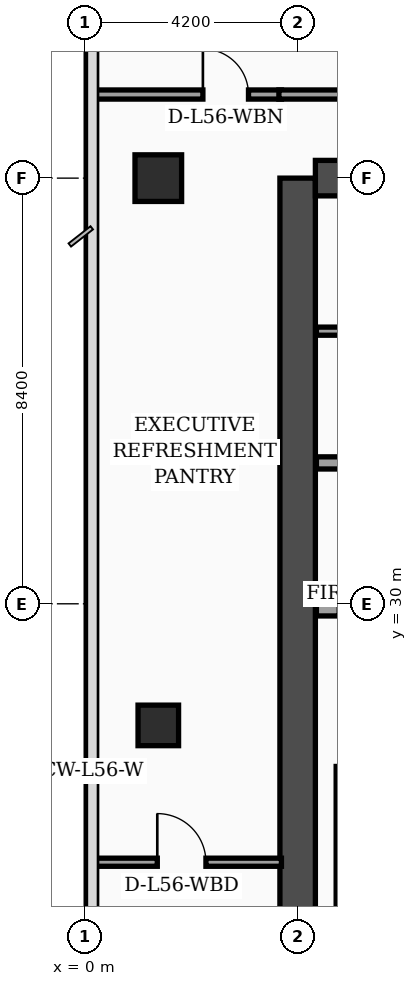
"""IFC4 building model, lengths in metres.
Left out: names, types, materials, properties, quantities, classifications, styles, units other than length and angle.
Written with IfcOpenShell. Run it as: python <this file> out.ifc"""

import sys

from ifc_helpers import new_model, si_unit, direction, frame, frame_2d, origin, origin_2d, place, context, subcontext, project, spatial, rectangle, extrude, element, fill, save


model = new_model("IFC4")
c1 = context("Model", 3, precision=1e-05, world=origin(), true_north=direction((0.0, 1.0)))
c2 = subcontext(c1, "Body", "Model", "MODEL_VIEW")
j1 = project(units=[si_unit("LENGTHUNIT", "METRE"), si_unit("PLANEANGLEUNIT", "RADIAN")], contexts=[c1])
p1 = place(None, origin())
s1 = spatial("IfcSite", under=j1, at=p1, CompositionType="ELEMENT")
p2 = place(p1, origin())
s2 = spatial("IfcBuilding", under=s1, at=p2, CompositionType="ELEMENT")
p3 = place(p2, frame((0.0, 0.0, 226.9)))
s3 = spatial("IfcBuildingStorey", under=s2, at=p3, CompositionType="ELEMENT", Elevation=226.9)
p4 = place(p3, frame((4.2, 16.8, 0.0), z_axis=(0.0, 0.0, 1.0), x_axis=(0.0, 1.0, 0.0)))
e1 = element("IfcWall", 1, at=p4, inside=s3, PredefinedType="SHEAR", context=c2, shape_type="SweptSolid", body=[
    extrude(rectangle(XDim=21.6, YDim=0.7, at=frame_2d((10.8, 0.0))), origin(), (0.0, 0.0, 1.0), 3.56),
])
p5 = place(p3, frame((4.55, 38.4, 0.0), z_axis=(0.0, 0.0, 1.0), x_axis=(1.0, 0.0, 0.0)))
e2 = element("IfcWall", 2, at=p5, inside=s3, PredefinedType="SHEAR", context=c2, shape_type="SweptSolid", body=[
    extrude(rectangle(XDim=10.1, YDim=0.7, at=frame_2d((5.05, 0.0))), origin(), (0.0, 0.0, 1.0), 3.56),
])
p6 = place(p3, frame((5.08, 17.15, 0.0), z_axis=(0.0, 0.0, 1.0), x_axis=(0.0, 1.0, 0.0)))
e3 = element("IfcWall", 3, at=p6, inside=s3, PredefinedType="SOLIDWALL", context=c2, shape_type="SweptSolid", body=[
    extrude(rectangle(XDim=9.64, YDim=0.24, at=frame_2d((4.82, 0.0))), origin(), (0.0, 0.0, 1.0), 3.56),
])
p7 = place(p3, frame((1.45, 27.6, 0.0), z_axis=(0.0, 0.0, 1.0), x_axis=(1.0, 0.0, 0.0)))
e4 = element("IfcColumn", 4, at=p7, inside=s3, PredefinedType="COLUMN", context=c2, shape_type="SweptSolid", body=[
    extrude(rectangle(XDim=0.8, YDim=0.8, at=origin_2d()), origin(), (0.0, 0.0, 1.0), 3.56),
])
p8 = place(p3, frame((1.45, 38.4, 0.0), z_axis=(0.0, 0.0, 1.0), x_axis=(1.0, 0.0, 0.0)))
e5 = element("IfcColumn", 5, at=p8, inside=s3, PredefinedType="COLUMN", context=c2, shape_type="SweptSolid", body=[
    extrude(rectangle(XDim=0.92, YDim=0.92, at=origin_2d()), origin(), (0.0, 0.0, 1.0), 3.56),
])
p9 = place(p3, frame((4.57, 29.88, 0.0), z_axis=(0.0, 0.0, 1.0), x_axis=(1.0, 0.0, 0.0)))
e6 = element("IfcWall", 6, at=p9, inside=s3, PredefinedType="SOLIDWALL", context=c2, shape_type="SweptSolid", body=[
    extrude(rectangle(XDim=4.85, YDim=0.24, at=frame_2d((2.425, 0.0))), origin(), (0.0, 0.0, 1.0), 3.56),
])
p10 = place(p9, frame((0.45, 0.0, 0.0)))
e7 = element("IfcOpeningElement", 7, at=p10, cuts=e6, PredefinedType="OPENING", context=c2, shape_type="SweptSolid", body=[
    extrude(rectangle(XDim=1.3, YDim=2.35, at=frame_2d((0.65, 1.175))), frame((0.0, 0.13, 0.0), z_axis=(0.0, -1.0, 0.0), x_axis=(1.0, 0.0, 0.0)), (0.0, 0.0, 1.0), 0.26),
])
p11 = place(p3, frame((4.57, 32.78, 0.0), z_axis=(0.0, 0.0, 1.0), x_axis=(1.0, 0.0, 0.0)))
e8 = element("IfcWall", 8, at=p11, inside=s3, PredefinedType="SOLIDWALL", context=c2, shape_type="SweptSolid", body=[
    extrude(rectangle(XDim=4.85, YDim=0.24, at=frame_2d((2.425, 0.0))), origin(), (0.0, 0.0, 1.0), 3.19),
])
p12 = place(p3, frame((4.57, 35.38, 0.0), z_axis=(0.0, 0.0, 1.0), x_axis=(1.0, 0.0, 0.0)))
e9 = element("IfcWall", 9, at=p12, inside=s3, PredefinedType="PARTITIONING", context=c2, shape_type="SweptSolid", body=[
    extrude(rectangle(XDim=4.85, YDim=0.16, at=frame_2d((2.425, 0.0))), origin(), (0.0, 0.0, 1.0), 3.56),
])
p13 = place(p12, frame((1.3, 0.0, 0.0)))
e10 = element("IfcOpeningElement", 10, at=p13, cuts=e9, PredefinedType="OPENING", context=c2, shape_type="SweptSolid", body=[
    extrude(rectangle(XDim=0.98, YDim=2.15, at=frame_2d((0.49, 1.075))), frame((0.0, 0.09, 0.0), z_axis=(0.0, -1.0, 0.0), x_axis=(1.0, 0.0, 0.0)), (0.0, 0.0, 1.0), 0.18),
])
p14 = place(p3, frame((0.08, 24.9, 0.0), z_axis=(0.0, 0.0, 1.0), x_axis=(1.0, 0.0, 0.0)))
e11 = element("IfcWall", 11, at=p14, inside=s3, PredefinedType="PARTITIONING", context=c2, shape_type="SweptSolid", body=[
    extrude(rectangle(XDim=3.8, YDim=0.16, at=frame_2d((1.9, 0.0))), origin(), (0.0, 0.0, 1.0), 3.09),
])
p15 = place(p14, frame((1.35, 0.0, 0.0)))
e12 = element("IfcOpeningElement", 12, at=p15, cuts=e11, PredefinedType="OPENING", context=c2, shape_type="SweptSolid", body=[
    extrude(rectangle(XDim=0.96, YDim=2.2, at=frame_2d((0.48, 1.1))), frame((0.0, 0.09, 0.0), z_axis=(0.0, -1.0, 0.0), x_axis=(1.0, 0.0, 0.0)), (0.0, 0.0, 1.0), 0.18),
])
p16 = place(p3, frame((0.08, 40.05, 0.0), z_axis=(0.0, 0.0, 1.0), x_axis=(1.0, 0.0, 0.0)))
e13 = element("IfcWall", 13, at=p16, inside=s3, PredefinedType="PARTITIONING", context=c2, shape_type="SweptSolid", body=[
    extrude(rectangle(XDim=3.8, YDim=0.18, at=frame_2d((1.9, 0.0))), origin(), (0.0, 0.0, 1.0), 2.94),
])
p17 = place(p16, frame((2.25, 0.0, 0.0)))
e14 = element("IfcOpeningElement", 14, at=p17, cuts=e13, PredefinedType="OPENING", context=c2, shape_type="SweptSolid", body=[
    extrude(rectangle(XDim=0.9, YDim=2.15, at=frame_2d((0.45, 1.075))), frame((0.0, 0.1, 0.0), z_axis=(0.0, -1.0, 0.0), x_axis=(1.0, 0.0, 0.0)), (0.0, 0.0, 1.0), 0.2),
])
p18 = place(p3, frame((3.83, 40.05, 0.0), z_axis=(0.0, 0.0, 1.0), x_axis=(1.0, 0.0, 0.0)))
e15 = element("IfcWall", 15, at=p18, inside=s3, PredefinedType="PARTITIONING", context=c2, shape_type="SweptSolid", body=[
    extrude(rectangle(XDim=11.32, YDim=0.18, at=frame_2d((5.66, 0.0))), origin(), (0.0, 0.0, 1.0), 2.94),
])
p19 = place(p15, origin())
e16 = element("IfcDoor", 16, at=p19, inside=s3, OperationType="SINGLE_SWING_LEFT", PredefinedType="DOOR", context=c2, shape_type="SweptSolid", body=[
    extrude(rectangle(XDim=0.96, YDim=2.2, at=frame_2d((0.48, 1.1))), frame((0.0, 0.025, 0.0), z_axis=(0.0, -1.0, 0.0), x_axis=(1.0, 0.0, 0.0)), (0.0, 0.0, 1.0), 0.05),
])
fill(e12, e16)
p20 = place(p17, origin())
e17 = element("IfcDoor", 17, at=p20, inside=s3, OperationType="SINGLE_SWING_LEFT", PredefinedType="DOOR", context=c2, shape_type="SweptSolid", body=[
    extrude(rectangle(XDim=0.9, YDim=2.15, at=frame_2d((0.45, 1.075))), frame((0.0, 0.025, 0.0), z_axis=(0.0, -1.0, 0.0), x_axis=(1.0, 0.0, 0.0)), (0.0, 0.0, 1.0), 0.05),
])
fill(e14, e17)
save(model, sys.argv[1])
